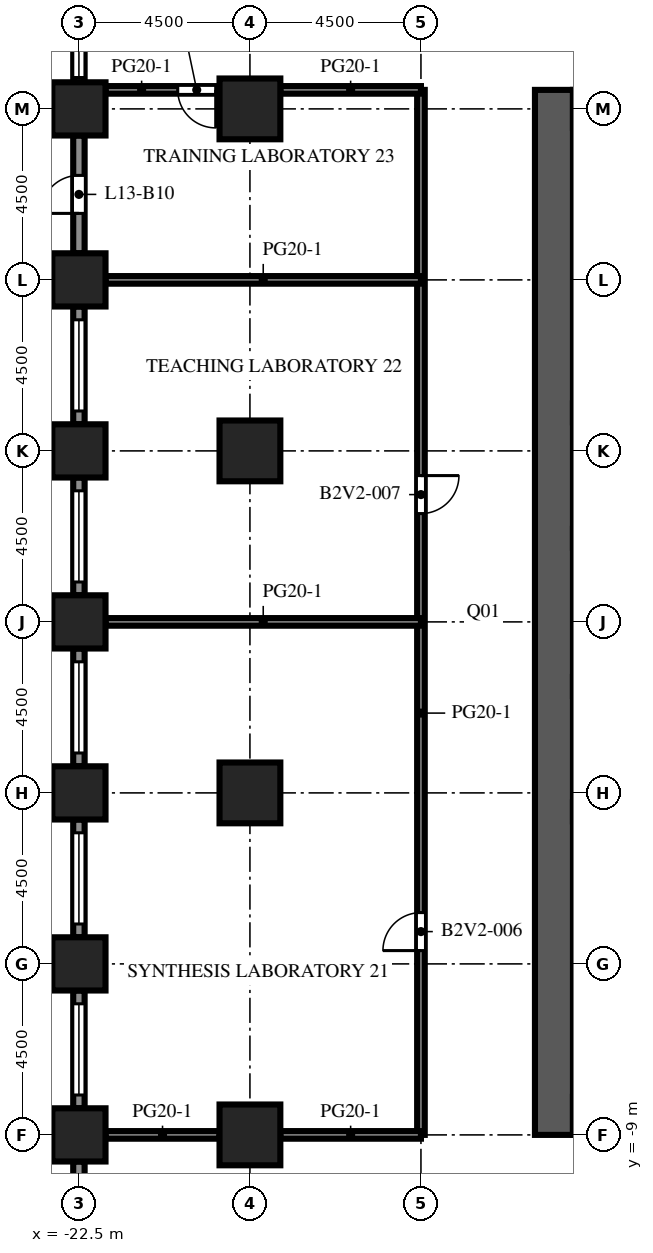
"""IFC4 building model, lengths in metres.
Left out: names, types, materials, properties, quantities, classifications, styles, units other than length and angle.
Written with IfcOpenShell. Run it as: python <this file> out.ifc"""

import sys

from ifc_helpers import new_model, si_unit, direction, frame, frame_2d, origin, origin_2d, place, context, subcontext, project, spatial, rectangle, extrude, element, fill, save


model = new_model("IFC4")
c1 = context("Model", 3, precision=1e-05, world=origin(), true_north=direction((0.0, 1.0)))
c2 = subcontext(c1, "Body", "Model", "MODEL_VIEW")
j1 = project(units=[si_unit("LENGTHUNIT", "METRE"), si_unit("PLANEANGLEUNIT", "RADIAN")], contexts=[c1])
p1 = place(None, origin())
s1 = spatial("IfcSite", under=j1, at=p1, CompositionType="ELEMENT")
p2 = place(p1, origin())
s2 = spatial("IfcBuilding", under=s1, at=p2, CompositionType="ELEMENT")
p3 = place(p2, frame((0.0, 0.0, 58.3)))
s3 = spatial("IfcBuildingStorey", under=s2, at=p3, CompositionType="ELEMENT", Elevation=58.3)
for number, where, z_axis, x_axis in (
    (1, (-22.5, -9.0, 0.0), (0.0, 0.0, 1.0), (1.0, 0.0, 0.0)),
    (2, (-22.5, -4.5, 0.0), (0.0, 0.0, 1.0), (1.0, 0.0, 0.0)),
    (3, (-22.5, 0.0, 0.0), (0.0, 0.0, 1.0), (1.0, 0.0, 0.0)),
    (4, (-22.5, 4.5, 0.0), (0.0, 0.0, 1.0), (1.0, 0.0, 0.0)),
    (5, (-22.5, 9.0, 0.0), (0.0, 0.0, 1.0), (1.0, 0.0, 0.0)),
    (6, (-22.5, 13.5, 0.0), (0.0, 0.0, 1.0), (1.0, 0.0, 0.0)),
    (7, (-22.5, 18.0, 0.0), (0.0, 0.0, 1.0), (1.0, 0.0, 0.0)),
):
    element("IfcColumn", number, at=place(p3, frame(where, z_axis=z_axis, x_axis=x_axis)), inside=s3, PredefinedType="COLUMN", context=c2, shape_type="SweptSolid", body=[
        extrude(rectangle(XDim=1.4, YDim=1.4, at=origin_2d()), origin(), (0.0, 0.0, 1.0), 4.1),
    ])
for number, where, z_axis, x_axis in (
    (8, (-18.0, -9.0, 0.0), (0.0, 0.0, 1.0), (1.0, 0.0, 0.0)),
    (9, (-18.0, 0.0, 0.0), (0.0, 0.0, 1.0), (1.0, 0.0, 0.0)),
    (10, (-18.0, 9.0, 0.0), (0.0, 0.0, 1.0), (1.0, 0.0, 0.0)),
    (11, (-18.0, 18.0, 0.0), (0.0, 0.0, 1.0), (1.0, 0.0, 0.0)),
):
    element("IfcColumn", number, at=place(p3, frame(where, z_axis=z_axis, x_axis=x_axis)), inside=s3, PredefinedType="COLUMN", context=c2, shape_type="SweptSolid", body=[
        extrude(rectangle(XDim=1.6, YDim=1.6, at=origin_2d()), origin(), (0.0, 0.0, 1.0), 4.1),
    ])
p4 = place(p3, frame((-10.0, -9.0, 0.0), z_axis=(0.0, 0.0, 1.0), x_axis=(0.0, 1.0, 0.0)))
e12 = element("IfcWall", 12, at=p4, inside=s3, PredefinedType="SHEAR", context=c2, shape_type="SweptSolid", body=[
    extrude(rectangle(XDim=27.5, YDim=1.0, at=frame_2d((13.75, 0.0))), origin(), (0.0, 0.0, 1.0), 4.1),
])
p5 = place(p4, frame((12.55, 0.0, 0.0)))
e13 = element("IfcOpeningElement", 13, at=p5, cuts=e12, PredefinedType="OPENING", context=c2, shape_type="SweptSolid", body=[
    extrude(rectangle(XDim=2.4, YDim=2.4, at=frame_2d((1.2, 1.2))), frame((0.0, 0.51, 0.0), z_axis=(0.0, -1.0, 0.0), x_axis=(1.0, 0.0, 0.0)), (0.0, 0.0, 1.0), 1.02),
])
p6 = place(p4, frame((6.825, 0.0, 0.0)))
e14 = element("IfcOpeningElement", 14, at=p6, cuts=e12, PredefinedType="OPENING", context=c2, shape_type="SweptSolid", body=[
    extrude(rectangle(XDim=1.2, YDim=2.1, at=frame_2d((0.6, 1.05))), frame((0.0, 0.51, 0.0), z_axis=(0.0, -1.0, 0.0), x_axis=(1.0, 0.0, 0.0)), (0.0, 0.0, 1.0), 1.02),
])
p7 = place(p4, frame((19.475, 0.0, 0.0)))
e15 = element("IfcOpeningElement", 15, at=p7, cuts=e12, PredefinedType="OPENING", context=c2, shape_type="SweptSolid", body=[
    extrude(rectangle(XDim=1.2, YDim=2.1, at=frame_2d((0.6, 1.05))), frame((0.0, 0.51, 0.0), z_axis=(0.0, -1.0, 0.0), x_axis=(1.0, 0.0, 0.0)), (0.0, 0.0, 1.0), 1.02),
])
p8 = place(p3, frame((-22.5, 18.7, 0.0), z_axis=(0.0, 0.0, 1.0), x_axis=(0.0, 1.0, 0.0)))
e16 = element("IfcWall", 16, at=p8, inside=s3, PredefinedType="SOLIDWALL", context=c2, shape_type="SweptSolid", body=[
    extrude(rectangle(XDim=3.1, YDim=0.3, at=frame_2d((1.55, 0.0))), origin(), (0.0, 0.0, 1.0), 2.75),
])
p9 = place(p8, frame((0.125, 0.0, 0.8)))
e17 = element("IfcOpeningElement", 17, at=p9, cuts=e16, PredefinedType="OPENING", context=c2, shape_type="SweptSolid", body=[
    extrude(rectangle(XDim=2.4, YDim=1.7, at=frame_2d((1.2, 0.85))), frame((0.0, 0.16, 0.0), z_axis=(0.0, -1.0, 0.0), x_axis=(1.0, 0.0, 0.0)), (0.0, 0.0, 1.0), 0.32),
])
p10 = place(p3, frame((-22.5, 14.2, 0.0), z_axis=(0.0, 0.0, 1.0), x_axis=(0.0, 1.0, 0.0)))
e18 = element("IfcWall", 18, at=p10, inside=s3, PredefinedType="SOLIDWALL", context=c2, shape_type="SweptSolid", body=[
    extrude(rectangle(XDim=3.1, YDim=0.3, at=frame_2d((1.55, 0.0))), origin(), (0.0, 0.0, 1.0), 2.75),
])
p11 = place(p10, frame((1.05, 0.0, 0.0)))
e19 = element("IfcOpeningElement", 19, at=p11, cuts=e18, PredefinedType="OPENING", context=c2, shape_type="SweptSolid", body=[
    extrude(rectangle(XDim=1.0, YDim=2.2, at=frame_2d((0.5, 1.1))), frame((0.0, 0.16, 0.0), z_axis=(0.0, -1.0, 0.0), x_axis=(1.0, 0.0, 0.0)), (0.0, 0.0, 1.0), 0.32),
])
p12 = place(p3, frame((-22.5, 9.7, 0.0), z_axis=(0.0, 0.0, 1.0), x_axis=(0.0, 1.0, 0.0)))
e20 = element("IfcWall", 20, at=p12, inside=s3, PredefinedType="SOLIDWALL", context=c2, shape_type="SweptSolid", body=[
    extrude(rectangle(XDim=3.1, YDim=0.3, at=frame_2d((1.55, 0.0))), origin(), (0.0, 0.0, 1.0), 2.75),
])
p13 = place(p12, frame((0.35, 0.0, 0.8)))
e21 = element("IfcOpeningElement", 21, at=p13, cuts=e20, PredefinedType="OPENING", context=c2, shape_type="SweptSolid", body=[
    extrude(rectangle(XDim=2.4, YDim=1.7, at=frame_2d((1.2, 0.85))), frame((0.0, 0.16, 0.0), z_axis=(0.0, -1.0, 0.0), x_axis=(1.0, 0.0, 0.0)), (0.0, 0.0, 1.0), 0.32),
])
p14 = place(p3, frame((-22.5, 5.2, 0.0), z_axis=(0.0, 0.0, 1.0), x_axis=(0.0, 1.0, 0.0)))
e22 = element("IfcWall", 22, at=p14, inside=s3, PredefinedType="SOLIDWALL", context=c2, shape_type="SweptSolid", body=[
    extrude(rectangle(XDim=3.1, YDim=0.3, at=frame_2d((1.55, 0.0))), origin(), (0.0, 0.0, 1.0), 2.75),
])
p15 = place(p14, frame((0.35, 0.0, 0.8)))
e23 = element("IfcOpeningElement", 23, at=p15, cuts=e22, PredefinedType="OPENING", context=c2, shape_type="SweptSolid", body=[
    extrude(rectangle(XDim=2.4, YDim=1.7, at=frame_2d((1.2, 0.85))), frame((0.0, 0.16, 0.0), z_axis=(0.0, -1.0, 0.0), x_axis=(1.0, 0.0, 0.0)), (0.0, 0.0, 1.0), 0.32),
])
p16 = place(p3, frame((-22.5, 0.7, 0.0), z_axis=(0.0, 0.0, 1.0), x_axis=(0.0, 1.0, 0.0)))
e24 = element("IfcWall", 24, at=p16, inside=s3, PredefinedType="SOLIDWALL", context=c2, shape_type="SweptSolid", body=[
    extrude(rectangle(XDim=3.1, YDim=0.3, at=frame_2d((1.55, 0.0))), origin(), (0.0, 0.0, 1.0), 2.75),
])
p17 = place(p16, frame((0.35, 0.0, 0.8)))
e25 = element("IfcOpeningElement", 25, at=p17, cuts=e24, PredefinedType="OPENING", context=c2, shape_type="SweptSolid", body=[
    extrude(rectangle(XDim=2.4, YDim=1.7, at=frame_2d((1.2, 0.85))), frame((0.0, 0.16, 0.0), z_axis=(0.0, -1.0, 0.0), x_axis=(1.0, 0.0, 0.0)), (0.0, 0.0, 1.0), 0.32),
])
p18 = place(p3, frame((-22.5, -3.8, 0.0), z_axis=(0.0, 0.0, 1.0), x_axis=(0.0, 1.0, 0.0)))
e26 = element("IfcWall", 26, at=p18, inside=s3, PredefinedType="SOLIDWALL", context=c2, shape_type="SweptSolid", body=[
    extrude(rectangle(XDim=3.1, YDim=0.3, at=frame_2d((1.55, 0.0))), origin(), (0.0, 0.0, 1.0), 2.75),
])
p19 = place(p18, frame((0.35, 0.0, 0.8)))
e27 = element("IfcOpeningElement", 27, at=p19, cuts=e26, PredefinedType="OPENING", context=c2, shape_type="SweptSolid", body=[
    extrude(rectangle(XDim=2.4, YDim=1.7, at=frame_2d((1.2, 0.85))), frame((0.0, 0.16, 0.0), z_axis=(0.0, -1.0, 0.0), x_axis=(1.0, 0.0, 0.0)), (0.0, 0.0, 1.0), 0.32),
])
p20 = place(p3, frame((-22.5, -8.3, 0.0), z_axis=(0.0, 0.0, 1.0), x_axis=(0.0, 1.0, 0.0)))
e28 = element("IfcWall", 28, at=p20, inside=s3, PredefinedType="SOLIDWALL", context=c2, shape_type="SweptSolid", body=[
    extrude(rectangle(XDim=3.1, YDim=0.3, at=frame_2d((1.55, 0.0))), origin(), (0.0, 0.0, 1.0), 2.75),
])
p21 = place(p20, frame((0.35, 0.0, 0.8)))
e29 = element("IfcOpeningElement", 29, at=p21, cuts=e28, PredefinedType="OPENING", context=c2, shape_type="SweptSolid", body=[
    extrude(rectangle(XDim=2.4, YDim=1.7, at=frame_2d((1.2, 0.85))), frame((0.0, 0.16, 0.0), z_axis=(0.0, -1.0, 0.0), x_axis=(1.0, 0.0, 0.0)), (0.0, 0.0, 1.0), 0.32),
])
p22 = place(p3, frame((-22.5, -12.8, 0.0), z_axis=(0.0, 0.0, 1.0), x_axis=(0.0, 1.0, 0.0)))
e30 = element("IfcWall", 30, at=p22, inside=s3, PredefinedType="SOLIDWALL", context=c2, shape_type="SweptSolid", body=[
    extrude(rectangle(XDim=3.1, YDim=0.3, at=frame_2d((1.55, 0.0))), origin(), (0.0, 0.0, 1.0), 2.75),
])
p23 = place(p22, frame((1.425, 0.0, 0.8)))
e31 = element("IfcOpeningElement", 31, at=p23, cuts=e30, PredefinedType="OPENING", context=c2, shape_type="SweptSolid", body=[
    extrude(rectangle(XDim=1.2, YDim=1.7, at=frame_2d((0.6, 0.85))), frame((0.0, 0.16, 0.0), z_axis=(0.0, -1.0, 0.0), x_axis=(1.0, 0.0, 0.0)), (0.0, 0.0, 1.0), 0.32),
])
p24 = place(p3, frame((-13.5, -9.0, 0.0), z_axis=(0.0, 0.0, 1.0), x_axis=(0.0, 1.0, 0.0)))
e32 = element("IfcWall", 32, at=p24, inside=s3, PredefinedType="PARTITIONING", context=c2, shape_type="SweptSolid", body=[
    extrude(rectangle(XDim=27.5, YDim=0.2, at=frame_2d((13.75, 0.0))), origin(), (0.0, 0.0, 1.0), 3.65),
])
p25 = place(p24, frame((4.85, 0.0, 0.0)))
e33 = element("IfcOpeningElement", 33, at=p25, cuts=e32, PredefinedType="OPENING", context=c2, shape_type="SweptSolid", body=[
    extrude(rectangle(XDim=1.0, YDim=2.1, at=frame_2d((0.5, 1.05))), frame((0.0, 0.11, 0.0), z_axis=(0.0, -1.0, 0.0), x_axis=(1.0, 0.0, 0.0)), (0.0, 0.0, 1.0), 0.22),
])
p26 = place(p24, frame((16.35, 0.0, 0.0)))
e34 = element("IfcOpeningElement", 34, at=p26, cuts=e32, PredefinedType="OPENING", context=c2, shape_type="SweptSolid", body=[
    extrude(rectangle(XDim=1.0, YDim=2.1, at=frame_2d((0.5, 1.05))), frame((0.0, 0.11, 0.0), z_axis=(0.0, -1.0, 0.0), x_axis=(1.0, 0.0, 0.0)), (0.0, 0.0, 1.0), 0.22),
])
p27 = place(p3, frame((-21.8, -9.0, 0.0), z_axis=(0.0, 0.0, 1.0), x_axis=(1.0, 0.0, 0.0)))
e35 = element("IfcWall", 35, at=p27, inside=s3, PredefinedType="PARTITIONING", context=c2, shape_type="SweptSolid", body=[
    extrude(rectangle(XDim=3.0, YDim=0.2, at=frame_2d((1.5, 0.0))), origin(), (0.0, 0.0, 1.0), 3.65),
])
p28 = place(p3, frame((-17.2, -9.0, 0.0), z_axis=(0.0, 0.0, 1.0), x_axis=(1.0, 0.0, 0.0)))
e36 = element("IfcWall", 36, at=p28, inside=s3, PredefinedType="PARTITIONING", context=c2, shape_type="SweptSolid", body=[
    extrude(rectangle(XDim=3.7, YDim=0.2, at=frame_2d((1.85, 0.0))), origin(), (0.0, 0.0, 1.0), 3.65),
])
for number, where, z_axis, x_axis in (
    (37, (-21.8, 4.5, 0.0), (0.0, 0.0, 1.0), (1.0, 0.0, 0.0)),
    (38, (-21.8, 13.5, 0.0), (0.0, 0.0, 1.0), (1.0, 0.0, 0.0)),
):
    element("IfcWall", number, at=place(p3, frame(where, z_axis=z_axis, x_axis=x_axis)), inside=s3, PredefinedType="PARTITIONING", context=c2, shape_type="SweptSolid", body=[
        extrude(rectangle(XDim=8.3, YDim=0.2, at=frame_2d((4.15, 0.0))), origin(), (0.0, 0.0, 1.0), 3.65),
    ])
p29 = place(p3, frame((-18.8, 18.5, 0.0), z_axis=(0.0, 0.0, 1.0), x_axis=(-1.0, 0.0, 0.0)))
e39 = element("IfcWall", 39, at=p29, inside=s3, PredefinedType="PARTITIONING", context=c2, shape_type="SweptSolid", body=[
    extrude(rectangle(XDim=3.0, YDim=0.2, at=frame_2d((1.5, 0.0))), origin(), (0.0, 0.0, 1.0), 3.65),
])
p30 = place(p29, frame((0.1, 0.0, 0.0)))
e40 = element("IfcOpeningElement", 40, at=p30, cuts=e39, PredefinedType="OPENING", context=c2, shape_type="SweptSolid", body=[
    extrude(rectangle(XDim=1.0, YDim=2.1, at=frame_2d((0.5, 1.05))), frame((0.0, 0.11, 0.0), z_axis=(0.0, -1.0, 0.0), x_axis=(1.0, 0.0, 0.0)), (0.0, 0.0, 1.0), 0.22),
])
p31 = place(p3, frame((-17.2, 18.5, 0.0), z_axis=(0.0, 0.0, 1.0), x_axis=(1.0, 0.0, 0.0)))
e41 = element("IfcWall", 41, at=p31, inside=s3, PredefinedType="PARTITIONING", context=c2, shape_type="SweptSolid", body=[
    extrude(rectangle(XDim=3.7, YDim=0.2, at=frame_2d((1.85, 0.0))), origin(), (0.0, 0.0, 1.0), 3.65),
])
p32 = place(p9, origin())
e42 = element("IfcWindow", 42, at=p32, inside=s3, PartitioningType="SINGLE_PANEL", PredefinedType="WINDOW", context=c2, shape_type="SweptSolid", body=[
    extrude(rectangle(XDim=2.4, YDim=1.7, at=frame_2d((1.2, 0.85))), frame((0.0, 0.03, 0.0), z_axis=(0.0, -1.0, 0.0), x_axis=(1.0, 0.0, 0.0)), (0.0, 0.0, 1.0), 0.06),
])
fill(e17, e42)
p33 = place(p11, origin())
e43 = element("IfcDoor", 43, at=p33, inside=s3, OperationType="SINGLE_SWING_LEFT", PredefinedType="DOOR", context=c2, shape_type="SweptSolid", body=[
    extrude(rectangle(XDim=1.0, YDim=2.2, at=frame_2d((0.5, 1.1))), frame((0.0, 0.025, 0.0), z_axis=(0.0, -1.0, 0.0), x_axis=(1.0, 0.0, 0.0)), (0.0, 0.0, 1.0), 0.05),
])
fill(e19, e43)
p34 = place(p13, origin())
e44 = element("IfcWindow", 44, at=p34, inside=s3, PartitioningType="SINGLE_PANEL", PredefinedType="WINDOW", context=c2, shape_type="SweptSolid", body=[
    extrude(rectangle(XDim=2.4, YDim=1.7, at=frame_2d((1.2, 0.85))), frame((0.0, 0.03, 0.0), z_axis=(0.0, -1.0, 0.0), x_axis=(1.0, 0.0, 0.0)), (0.0, 0.0, 1.0), 0.06),
])
fill(e21, e44)
p35 = place(p15, origin())
e45 = element("IfcWindow", 45, at=p35, inside=s3, PartitioningType="SINGLE_PANEL", PredefinedType="WINDOW", context=c2, shape_type="SweptSolid", body=[
    extrude(rectangle(XDim=2.4, YDim=1.7, at=frame_2d((1.2, 0.85))), frame((0.0, 0.03, 0.0), z_axis=(0.0, -1.0, 0.0), x_axis=(1.0, 0.0, 0.0)), (0.0, 0.0, 1.0), 0.06),
])
fill(e23, e45)
p36 = place(p17, origin())
e46 = element("IfcWindow", 46, at=p36, inside=s3, PartitioningType="SINGLE_PANEL", PredefinedType="WINDOW", context=c2, shape_type="SweptSolid", body=[
    extrude(rectangle(XDim=2.4, YDim=1.7, at=frame_2d((1.2, 0.85))), frame((0.0, 0.03, 0.0), z_axis=(0.0, -1.0, 0.0), x_axis=(1.0, 0.0, 0.0)), (0.0, 0.0, 1.0), 0.06),
])
fill(e25, e46)
p37 = place(p19, origin())
e47 = element("IfcWindow", 47, at=p37, inside=s3, PartitioningType="SINGLE_PANEL", PredefinedType="WINDOW", context=c2, shape_type="SweptSolid", body=[
    extrude(rectangle(XDim=2.4, YDim=1.7, at=frame_2d((1.2, 0.85))), frame((0.0, 0.03, 0.0), z_axis=(0.0, -1.0, 0.0), x_axis=(1.0, 0.0, 0.0)), (0.0, 0.0, 1.0), 0.06),
])
fill(e27, e47)
p38 = place(p21, origin())
e48 = element("IfcWindow", 48, at=p38, inside=s3, PartitioningType="SINGLE_PANEL", PredefinedType="WINDOW", context=c2, shape_type="SweptSolid", body=[
    extrude(rectangle(XDim=2.4, YDim=1.7, at=frame_2d((1.2, 0.85))), frame((0.0, 0.03, 0.0), z_axis=(0.0, -1.0, 0.0), x_axis=(1.0, 0.0, 0.0)), (0.0, 0.0, 1.0), 0.06),
])
fill(e29, e48)
p39 = place(p5, origin())
e49 = element("IfcDoor", 49, at=p39, inside=s3, OperationType="DOUBLE_DOOR_DOUBLE_SWING", PredefinedType="DOOR", context=c2, shape_type="SweptSolid", body=[
    extrude(rectangle(XDim=2.4, YDim=2.4, at=frame_2d((1.2, 1.2))), frame((0.0, 0.025, 0.0), z_axis=(0.0, -1.0, 0.0), x_axis=(1.0, 0.0, 0.0)), (0.0, 0.0, 1.0), 0.05),
])
fill(e13, e49)
p40 = place(p6, origin())
e50 = element("IfcDoor", 50, at=p40, inside=s3, OperationType="SINGLE_SWING_LEFT", PredefinedType="DOOR", context=c2, shape_type="SweptSolid", body=[
    extrude(rectangle(XDim=1.2, YDim=2.1, at=frame_2d((0.6, 1.05))), frame((0.0, 0.025, 0.0), z_axis=(0.0, -1.0, 0.0), x_axis=(1.0, 0.0, 0.0)), (0.0, 0.0, 1.0), 0.05),
])
fill(e14, e50)
p41 = place(p7, origin())
e51 = element("IfcDoor", 51, at=p41, inside=s3, OperationType="SINGLE_SWING_LEFT", PredefinedType="DOOR", context=c2, shape_type="SweptSolid", body=[
    extrude(rectangle(XDim=1.2, YDim=2.1, at=frame_2d((0.6, 1.05))), frame((0.0, 0.025, 0.0), z_axis=(0.0, -1.0, 0.0), x_axis=(1.0, 0.0, 0.0)), (0.0, 0.0, 1.0), 0.05),
])
fill(e15, e51)
p42 = place(p25, origin())
e52 = element("IfcDoor", 52, at=p42, inside=s3, OperationType="SINGLE_SWING_LEFT", PredefinedType="DOOR", context=c2, shape_type="SweptSolid", body=[
    extrude(rectangle(XDim=1.0, YDim=2.1, at=frame_2d((0.5, 1.05))), frame((0.0, 0.025, 0.0), z_axis=(0.0, -1.0, 0.0), x_axis=(1.0, 0.0, 0.0)), (0.0, 0.0, 1.0), 0.05),
])
fill(e33, e52)
p43 = place(p26, origin())
e53 = element("IfcDoor", 53, at=p43, inside=s3, OperationType="SINGLE_SWING_RIGHT", PredefinedType="DOOR", context=c2, shape_type="SweptSolid", body=[
    extrude(rectangle(XDim=1.0, YDim=2.1, at=frame_2d((0.5, 1.05))), frame((0.0, 0.025, 0.0), z_axis=(0.0, -1.0, 0.0), x_axis=(1.0, 0.0, 0.0)), (0.0, 0.0, 1.0), 0.05),
])
fill(e34, e53)
p44 = place(p30, origin())
e54 = element("IfcDoor", 54, at=p44, inside=s3, OperationType="SINGLE_SWING_LEFT", PredefinedType="DOOR", context=c2, shape_type="SweptSolid", body=[
    extrude(rectangle(XDim=1.0, YDim=2.1, at=frame_2d((0.5, 1.05))), frame((0.0, 0.025, 0.0), z_axis=(0.0, -1.0, 0.0), x_axis=(1.0, 0.0, 0.0)), (0.0, 0.0, 1.0), 0.05),
])
fill(e40, e54)
save(model, sys.argv[1])
